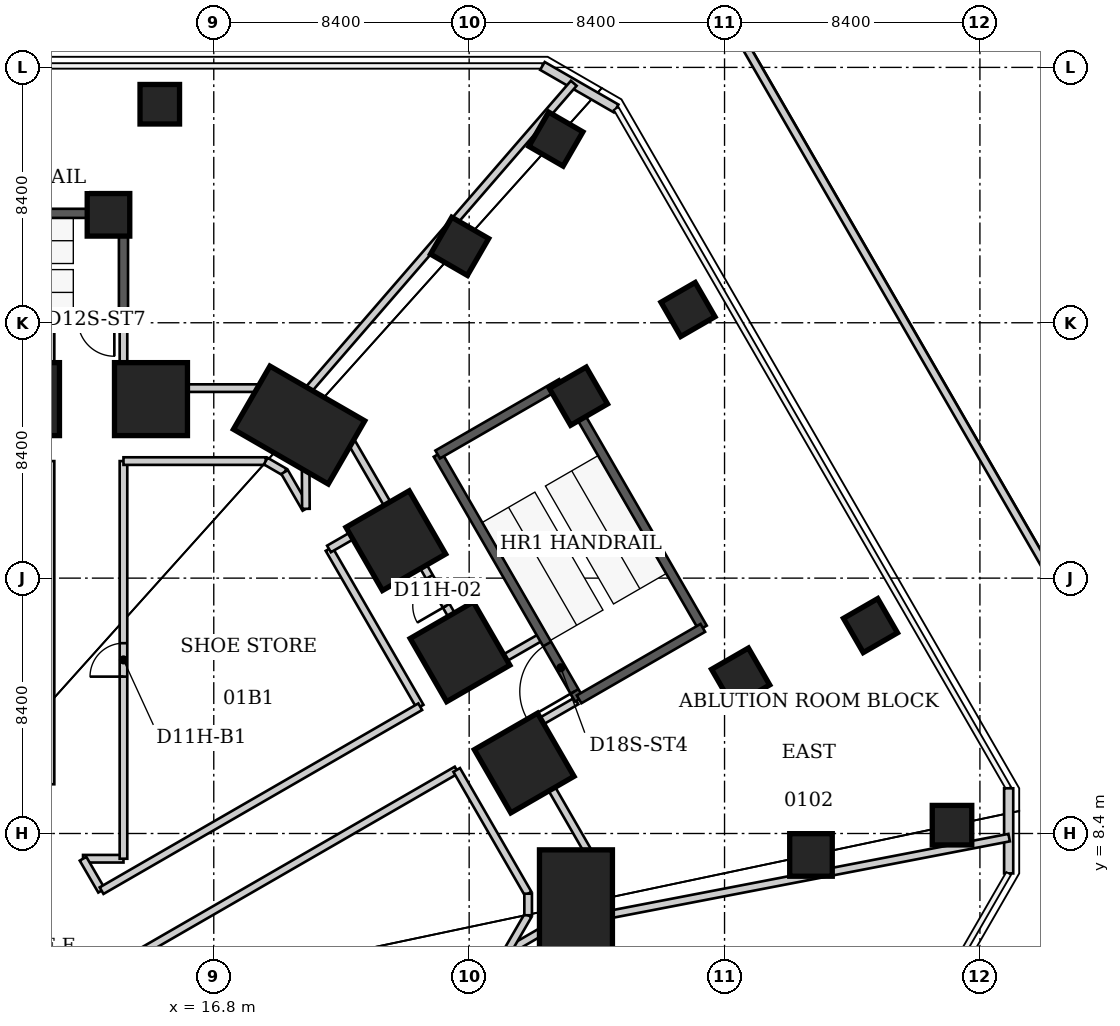
"""IFC4 building model, lengths in metres.
Left out: names, types, materials, properties, quantities, classifications, styles, units other than length and angle.
Written with IfcOpenShell. Run it as: python <this file> out.ifc"""

import sys

from ifc_helpers import new_model, si_unit, direction, frame, frame_2d, origin, origin_2d, place, context, subcontext, project, spatial, rectangle, extrude, element, fill, save


model = new_model("IFC4")
c1 = context("Model", 3, precision=1e-05, world=origin(), true_north=direction((0.0, 1.0)))
c2 = subcontext(c1, "Body", "Model", "MODEL_VIEW")
j1 = project(units=[si_unit("LENGTHUNIT", "METRE"), si_unit("PLANEANGLEUNIT", "RADIAN")], contexts=[c1])
p1 = place(None, origin())
s1 = spatial("IfcSite", under=j1, at=p1, CompositionType="ELEMENT")
p2 = place(p1, origin())
s2 = spatial("IfcBuilding", under=s1, at=p2, CompositionType="ELEMENT")
p3 = place(p2, frame((0.0, 0.0, 6.0)))
s3 = spatial("IfcBuildingStorey", under=s2, at=p3, CompositionType="ELEMENT", Elevation=6.0)
for number, where, z_axis, x_axis in (
    (1, (10.525, 22.689, 0.0), (0.0, 0.0, 1.0), (0.0, 1.0, 0.0)),
    (2, (14.735, 22.689, 0.0), (0.0, 0.0, 1.0), (0.0, 1.0, 0.0)),
):
    element("IfcColumn", number, at=place(p3, frame(where, z_axis=z_axis, x_axis=x_axis)), inside=s3, PredefinedType="COLUMN", context=c2, shape_type="SweptSolid", body=[
        extrude(rectangle(XDim=2.4, YDim=2.4, at=origin_2d()), origin(), (0.0, 0.0, 1.0), 6.0),
    ])
p4 = place(p3, frame((19.606, 21.835, 0.0), z_axis=(0.0, 0.0, 1.0), x_axis=(0.5, 0.866025403784, 0.0)))
e3 = element("IfcColumn", 3, at=p4, inside=s3, PredefinedType="COLUMN", context=c2, shape_type="SweptSolid", body=[
    extrude(rectangle(XDim=2.4, YDim=3.6, at=origin_2d()), origin(), (0.0, 0.0, 1.0), 6.0),
])
for number, where, z_axis, x_axis in (
    (4, (22.788, 18.032, 0.0), (0.0, 0.0, 1.0), (0.866, 0.5, 0.0)),
    (5, (24.899, 14.375, 0.0), (0.0, 0.0, 1.0), (0.866, 0.5, 0.0)),
    (6, (27.01, 10.719, 0.0), (0.0, 0.0, 1.0), (0.866, 0.5, 0.0)),
):
    element("IfcColumn", number, at=place(p3, frame(where, z_axis=z_axis, x_axis=x_axis)), inside=s3, PredefinedType="COLUMN", context=c2, shape_type="SweptSolid", body=[
        extrude(rectangle(XDim=2.4, YDim=2.4, at=origin_2d()), origin(), (0.0, 0.0, 1.0), 6.0),
    ])
p5 = place(p3, frame((28.713, 6.062, 0.0), z_axis=(0.0, 0.0, 1.0), x_axis=(1.0, 0.0, 0.0)))
e7 = element("IfcColumn", 7, at=p5, inside=s3, PredefinedType="COLUMN", context=c2, shape_type="SweptSolid", body=[
    extrude(rectangle(XDim=2.4, YDim=3.6, at=origin_2d()), origin(), (0.0, 0.0, 1.0), 6.0),
])
for number, where, z_axis, x_axis in (
    (8, (13.337, 28.751, 0.0), (0.0, 0.0, 1.0), (0.0, 1.0, 0.0)),
    (9, (24.885, 27.714, 0.0), (0.0, 0.0, 1.0), (0.5, 0.866, 0.0)),
    (10, (28.794, 22.785, 0.0), (0.0, 0.0, 1.0), (0.866, 0.5, 0.0)),
    (11, (34.129, 13.544, 0.0), (0.0, 0.0, 1.0), (0.866, 0.5, 0.0)),
    (12, (36.443, 7.694, 0.0), (0.0, 0.0, 1.0), (1.0, 0.0, 0.0)),
):
    element("IfcColumn", number, at=place(p3, frame(where, z_axis=z_axis, x_axis=x_axis)), inside=s3, PredefinedType="COLUMN", context=c2, shape_type="SweptSolid", body=[
        extrude(rectangle(XDim=1.4, YDim=1.4, at=origin_2d()), origin(), (0.0, 0.0, 1.0), 6.0),
    ])
for number, where, z_axis, x_axis in (
    (13, (15.024, 32.388, 0.0), (0.0, 0.0, 1.0), (0.0, 1.0, 0.0)),
    (14, (28.052, 31.241, 0.0), (0.0, 0.0, 1.0), (0.5, 0.866, 0.0)),
    (15, (32.397, 25.636, 0.0), (0.0, 0.0, 1.0), (0.866, 0.5, 0.0)),
    (16, (38.4, 15.239, 0.0), (0.0, 0.0, 1.0), (0.866, 0.5, 0.0)),
    (17, (41.082, 8.674, 0.0), (0.0, 0.0, 1.0), (1.0, 0.0, 0.0)),
):
    element("IfcColumn", number, at=place(p3, frame(where, z_axis=z_axis, x_axis=x_axis)), inside=s3, PredefinedType="COLUMN", context=c2, shape_type="SweptSolid", body=[
        extrude(rectangle(XDim=1.3, YDim=1.3, at=origin_2d()), origin(), (0.0, 0.0, 1.0), 6.0),
    ])
p6 = place(p3, frame((27.61, 33.648, 0.0), z_axis=(0.0, 0.0, 1.0), x_axis=(0.866056369097, -0.49994636267, 0.0)))
e18 = element("IfcWall", 18, at=p6, inside=s3, PredefinedType="SOLIDWALL", context=c2, shape_type="SweptSolid", body=[
    extrude(rectangle(XDim=2.8, YDim=0.3, at=frame_2d((1.4, 0.0))), origin(), (0.0, 0.0, 1.0), 5.84),
])
p7 = place(p3, frame((42.945, 9.887, 0.0), z_axis=(0.0, 0.0, 1.0), x_axis=(0.0, -1.0, 0.0)))
e19 = element("IfcWall", 19, at=p7, inside=s3, PredefinedType="SOLIDWALL", context=c2, shape_type="SweptSolid", body=[
    extrude(rectangle(XDim=2.8, YDim=0.3, at=frame_2d((1.4, 0.0))), origin(), (0.0, 0.0, 1.0), 5.84),
])
p8 = place(p3, frame((17.117, -45.292, 0.0), z_axis=(0.0, 0.0, 1.0), x_axis=(0.499999154746, 0.866025891791, 0.0)))
e20 = element("IfcWall", 20, at=p8, inside=s3, PredefinedType="PARAPET", context=c2, shape_type="SweptSolid", body=[
    extrude(rectangle(XDim=61.33, YDim=0.25, at=frame_2d((30.665, 0.0))), origin(), (0.0, 0.0, 1.0), 1.1),
])
p9 = place(p3, frame((47.784, 10.913, 0.0), z_axis=(0.0, 0.0, 1.0), x_axis=(-0.500005626994, 0.866022155013, 0.0)))
e21 = element("IfcWall", 21, at=p9, inside=s3, PredefinedType="PARAPET", context=c2, shape_type="SweptSolid", body=[
    extrude(rectangle(XDim=28.882, YDim=0.25, at=frame_2d((14.441, 0.0))), origin(), (0.0, 0.0, 1.0), 1.1),
])
p10 = place(p3, frame((11.43, 20.65, 0.0), z_axis=(0.0, 0.0, 1.0), x_axis=(0.0, -1.0, 0.0)))
e22 = element("IfcWall", 22, at=p10, inside=s3, PredefinedType="PARTITIONING", context=c2, shape_type="SweptSolid", body=[
    extrude(rectangle(XDim=10.63, YDim=0.25, at=frame_2d((5.315, 0.0))), origin(), (0.0, 0.0, 1.0), 5.84),
])
p11 = place(p3, frame((11.43, 25.2, 0.0), z_axis=(0.0, 0.0, 1.0), x_axis=(0.0, -1.0, 0.0)))
e23 = element("IfcWall", 23, at=p11, inside=s3, PredefinedType="PARTITIONING", context=c2, shape_type="SweptSolid", body=[
    extrude(rectangle(XDim=2.15, YDim=0.25, at=frame_2d((1.075, 0.0))), origin(), (0.0, 0.0, 1.0), 5.84),
])
p12 = place(p3, frame((12.23, 3.24, 0.0), z_axis=(0.0, 0.0, 1.0), x_axis=(0.866071776036, 0.499919672301, 0.0)))
e24 = element("IfcWall", 24, at=p12, inside=s3, PredefinedType="PARTITIONING", context=c2, shape_type="SweptSolid", body=[
    extrude(rectangle(XDim=14.502, YDim=0.25, at=frame_2d((7.251, 0.0))), origin(), (0.0, 0.0, 1.0), 5.84),
])
p13 = place(p3, frame((12.5, 7.57, 0.0), z_axis=(0.0, 0.0, 1.0), x_axis=(1.0, 0.0, 0.0)))
e25 = element("IfcWall", 25, at=p13, inside=s3, PredefinedType="PARTITIONING", context=c2, shape_type="SweptSolid", body=[
    extrude(rectangle(XDim=1.33, YDim=0.25, at=frame_2d((0.665, 0.0))), origin(), (0.0, 0.0, 1.0), 5.84),
])
p14 = place(p3, frame((13.11, 6.52, 0.0), z_axis=(0.0, 0.0, 1.0), x_axis=(-0.502382838514, 0.864645293497, 0.0)))
e26 = element("IfcWall", 26, at=p14, inside=s3, PredefinedType="PARTITIONING", context=c2, shape_type="SweptSolid", body=[
    extrude(rectangle(XDim=1.214, YDim=0.25, at=frame_2d((0.607, 0.0))), origin(), (0.0, 0.0, 1.0), 5.84),
])
p15 = place(p3, frame((13.83, 7.57, 0.0), z_axis=(0.0, 0.0, 1.0), x_axis=(0.0, 1.0, 0.0)))
e27 = element("IfcWall", 27, at=p15, inside=s3, PredefinedType="PARTITIONING", context=c2, shape_type="SweptSolid", body=[
    extrude(rectangle(XDim=13.08, YDim=0.25, at=frame_2d((6.54, 0.0))), origin(), (0.0, 0.0, 1.0), 5.84),
])
p16 = place(p15, frame((5.99, 0.0, 0.0)))
e28 = element("IfcOpeningElement", 28, at=p16, cuts=e27, PredefinedType="OPENING", context=c2, shape_type="SweptSolid", body=[
    extrude(rectangle(XDim=1.1, YDim=2.2, at=frame_2d((0.55, 1.1))), frame((0.0, 0.125, 0.0), z_axis=(0.0, -1.0, 0.0), x_axis=(1.0, 0.0, 0.0)), (0.0, 0.0, 1.0), 0.25),
])
p17 = place(p3, frame((13.83, 20.65, 0.0), z_axis=(0.0, 0.0, 1.0), x_axis=(1.0, 0.0, 0.0)))
e29 = element("IfcWall", 29, at=p17, inside=s3, PredefinedType="PARTITIONING", context=c2, shape_type="SweptSolid", body=[
    extrude(rectangle(XDim=4.68, YDim=0.25, at=frame_2d((2.34, 0.0))), origin(), (0.0, 0.0, 1.0), 5.84),
])
p18 = place(p3, frame((13.83, 23.05, 0.0), z_axis=(0.0, 0.0, 1.0), x_axis=(0.0, 1.0, 0.0)))
e30 = element("IfcWall", 30, at=p18, inside=s3, PredefinedType="PARTITIONING", context=c2, shape_type="SweptSolid", body=[
    extrude(rectangle(XDim=2.15, YDim=0.25, at=frame_2d((1.075, 0.0))), origin(), (0.0, 0.0, 1.0), 5.84),
])
p19 = place(p3, frame((18.51, 20.65, 0.0), z_axis=(0.0, 0.0, 1.0), x_axis=(0.864827114446, -0.502069778138, 0.0)))
e31 = element("IfcWall", 31, at=p19, inside=s3, PredefinedType="PARTITIONING", context=c2, shape_type="SweptSolid", body=[
    extrude(rectangle(XDim=0.717, YDim=0.25, at=frame_2d((0.358, 0.0))), origin(), (0.0, 0.0, 1.0), 5.84),
])
p20 = place(p3, frame((19.13, 20.29, 0.0), z_axis=(0.0, 0.0, 1.0), x_axis=(0.500871040665, -0.865521923826, 0.0)))
e32 = element("IfcWall", 32, at=p20, inside=s3, PredefinedType="PARTITIONING", context=c2, shape_type="SweptSolid", body=[
    extrude(rectangle(XDim=1.398, YDim=0.25, at=frame_2d((0.699, 0.0))), origin(), (0.0, 0.0, 1.0), 5.84),
])
p21 = place(p3, frame((19.15, 23.05, 0.0), z_axis=(0.0, 0.0, 1.0), x_axis=(-1.0, 0.0, 0.0)))
e33 = element("IfcWall", 33, at=p21, inside=s3, PredefinedType="PARTITIONING", context=c2, shape_type="SweptSolid", body=[
    extrude(rectangle(XDim=5.32, YDim=0.25, at=frame_2d((2.66, 0.0))), origin(), (0.0, 0.0, 1.0), 4.04),
])
p22 = place(p3, frame((19.15, 23.05, 0.0), z_axis=(0.0, 0.0, 1.0), x_axis=(0.866627900645, -0.498954989777, 0.0)))
e34 = element("IfcWall", 34, at=p22, inside=s3, PredefinedType="PARTITIONING", context=c2, shape_type="SweptSolid", body=[
    extrude(rectangle(XDim=0.588, YDim=0.25, at=frame_2d((0.294, 0.0))), origin(), (0.0, 0.0, 1.0), 5.84),
])
p23 = place(p3, frame((19.733, 22.715, 0.0), z_axis=(0.0, 0.0, 1.0), x_axis=(0.866550582058, -0.499089259287, 0.0)))
e35 = element("IfcWall", 35, at=p23, inside=s3, PredefinedType="PARTITIONING", context=c2, shape_type="SweptSolid", body=[
    extrude(rectangle(XDim=0.089, YDim=0.25, at=frame_2d((0.044, 0.0))), origin(), (0.0, 0.0, 1.0), 5.84),
])
p24 = place(p3, frame((19.83, 19.08, 0.0), z_axis=(0.0, 0.0, 1.0), x_axis=(-0.005576247883, 0.999984452609, 0.0)))
e36 = element("IfcWall", 36, at=p24, inside=s3, PredefinedType="PARTITIONING", context=c2, shape_type="SweptSolid", body=[
    extrude(rectangle(XDim=3.59, YDim=0.25, at=frame_2d((1.795, 0.0))), origin(), (0.0, 0.0, 1.0), 5.84),
])
p25 = place(p3, frame((20.59, 17.76, 0.0), z_axis=(0.0, 0.0, 1.0), x_axis=(0.50044857655, -0.865766263046, 0.0)))
e37 = element("IfcWall", 37, at=p25, inside=s3, PredefinedType="PARTITIONING", context=c2, shape_type="SweptSolid", body=[
    extrude(rectangle(XDim=5.995, YDim=0.25, at=frame_2d((2.997, 0.0))), origin(), (0.0, 0.0, 1.0), 5.84),
])
p26 = place(p3, frame((20.88, 22.05, 0.0), z_axis=(0.0, 0.0, 1.0), x_axis=(-0.865250488556, 0.501339796998, 0.0)))
e38 = element("IfcWall", 38, at=p26, inside=s3, PredefinedType="PARTITIONING", context=c2, shape_type="SweptSolid", body=[
    extrude(rectangle(XDim=1.236, YDim=0.25, at=frame_2d((0.618, 0.0))), origin(), (0.0, 0.0, 1.0), 5.84),
])
p27 = place(p3, frame((22.67, 18.96, 0.0), z_axis=(0.0, 0.0, 1.0), x_axis=(-0.866177122335, -0.499737123639, 0.0)))
e39 = element("IfcWall", 39, at=p27, inside=s3, PredefinedType="PARTITIONING", context=c2, shape_type="SweptSolid", body=[
    extrude(rectangle(XDim=2.401, YDim=0.25, at=frame_2d((1.201, 0.0))), origin(), (0.0, 0.0, 1.0), 5.84),
])
p28 = place(p3, frame((22.67, 18.96, 0.0), z_axis=(0.0, 0.0, 1.0), x_axis=(-0.501254541389, 0.865299881392, 0.0)))
e40 = element("IfcWall", 40, at=p28, inside=s3, PredefinedType="PARTITIONING", context=c2, shape_type="SweptSolid", body=[
    extrude(rectangle(XDim=3.571, YDim=0.25, at=frame_2d((1.786, 0.0))), origin(), (0.0, 0.0, 1.0), 5.84),
])
p29 = place(p3, frame((23.59, 12.57, 0.0), z_axis=(0.0, 0.0, 1.0), x_axis=(-0.866045825216, -0.499964627375, 0.0)))
e41 = element("IfcWall", 41, at=p29, inside=s3, PredefinedType="PARTITIONING", context=c2, shape_type="SweptSolid", body=[
    extrude(rectangle(XDim=12.101, YDim=0.25, at=frame_2d((6.051, 0.0))), origin(), (0.0, 0.0, 1.0), 5.84),
])
p30 = place(p3, frame((23.95, -4.61, 0.0), z_axis=(0.0, 0.0, 1.0), x_axis=(0.50047095257, 0.865753328399, 0.0)))
e42 = element("IfcWall", 42, at=p30, inside=s3, PredefinedType="PARTITIONING", context=c2, shape_type="SweptSolid", body=[
    extrude(rectangle(XDim=11.17, YDim=0.25, at=frame_2d((5.585, 0.0))), origin(), (0.0, 0.0, 1.0), 4.04),
])
p31 = place(p3, frame((24.79, 10.49, 0.0), z_axis=(0.0, 0.0, 1.0), x_axis=(0.499999753078, -0.866025546345, 0.0)))
e43 = element("IfcWall", 43, at=p31, inside=s3, PredefinedType="PARTITIONING", context=c2, shape_type="SweptSolid", body=[
    extrude(rectangle(XDim=4.7, YDim=0.25, at=frame_2d((2.35, 0.0))), origin(), (0.0, 0.0, 1.0), 5.84),
])
p32 = place(p3, frame((25.67, 13.77, 0.0), z_axis=(0.0, 0.0, 1.0), x_axis=(-0.50044857655, 0.865766263046, 0.0)))
e44 = element("IfcWall", 44, at=p32, inside=s3, PredefinedType="PARTITIONING", context=c2, shape_type="SweptSolid", body=[
    extrude(rectangle(XDim=5.995, YDim=0.25, at=frame_2d((2.997, 0.0))), origin(), (0.0, 0.0, 1.0), 4.04),
])
p33 = place(p32, frame((2.448, 0.0, 0.0)))
e45 = element("IfcOpeningElement", 45, at=p33, cuts=e44, PredefinedType="OPENING", context=c2, shape_type="SweptSolid", body=[
    extrude(rectangle(XDim=1.1, YDim=2.2, at=frame_2d((0.55, 1.1))), frame((0.0, 0.125, 0.0), z_axis=(0.0, -1.0, 0.0), x_axis=(1.0, 0.0, 0.0)), (0.0, 0.0, 1.0), 0.25),
])
p34 = place(p3, frame((26.45, 4.52, 0.0), z_axis=(0.0, 0.0, 1.0), x_axis=(0.865299881392, 0.501254541389, 0.0)))
e46 = element("IfcWall", 46, at=p34, inside=s3, PredefinedType="PARTITIONING", context=c2, shape_type="SweptSolid", body=[
    extrude(rectangle(XDim=3.571, YDim=0.25, at=frame_2d((1.786, 0.0))), origin(), (0.0, 0.0, 1.0), 5.84),
])
p35 = place(p3, frame((26.87, 11.69, 0.0), z_axis=(0.0, 0.0, 1.0), x_axis=(0.866775979586, 0.498697705241, 0.0)))
e47 = element("IfcWall", 47, at=p35, inside=s3, PredefinedType="PARTITIONING", context=c2, shape_type="SweptSolid", body=[
    extrude(rectangle(XDim=2.146, YDim=0.25, at=frame_2d((1.073, 0.0))), origin(), (0.0, 0.0, 1.0), 5.84),
])
p36 = place(p3, frame((27.14, 5.71, 0.0), z_axis=(0.0, 0.0, 1.0), x_axis=(-0.501595895466, -0.865102050426, 0.0)))
e48 = element("IfcWall", 48, at=p36, inside=s3, PredefinedType="PARTITIONING", context=c2, shape_type="SweptSolid", body=[
    extrude(rectangle(XDim=1.375, YDim=0.25, at=frame_2d((0.688, 0.0))), origin(), (0.0, 0.0, 1.0), 5.84),
])
p37 = place(p3, frame((27.14, 6.42, 0.0), z_axis=(0.0, 0.0, 1.0), x_axis=(0.0, -1.0, 0.0)))
e49 = element("IfcWall", 49, at=p37, inside=s3, PredefinedType="PARTITIONING", context=c2, shape_type="SweptSolid", body=[
    extrude(rectangle(XDim=0.71, YDim=0.25, at=frame_2d((0.355, 0.0))), origin(), (0.0, 0.0, 1.0), 5.84),
])
p38 = place(p3, frame((27.53, 14.84, 0.0), z_axis=(0.0, 0.0, 1.0), x_axis=(-0.866804272416, -0.498648526841, 0.0)))
e50 = element("IfcWall", 50, at=p38, inside=s3, PredefinedType="PARTITIONING", context=c2, shape_type="SweptSolid", body=[
    extrude(rectangle(XDim=2.146, YDim=0.25, at=frame_2d((1.073, 0.0))), origin(), (0.0, 0.0, 1.0), 5.84),
])
p39 = place(p3, frame((28.64, 33.077, 0.0), z_axis=(0.0, 0.0, 1.0), x_axis=(-0.654569518712, -0.756001815589, 0.0)))
e51 = element("IfcWall", 51, at=p39, inside=s3, PredefinedType="PARTITIONING", context=c2, shape_type="SweptSolid", body=[
    extrude(rectangle(XDim=13.674, YDim=0.25, at=frame_2d((6.837, 0.0))), origin(), (0.0, 0.0, 1.0), 5.75),
])
p40 = place(p3, frame((29.54, 5.645, 0.0), z_axis=(0.0, 0.0, 1.0), x_axis=(0.0, -1.0, 0.0)))
e52 = element("IfcWall", 52, at=p40, inside=s3, PredefinedType="PARTITIONING", context=c2, shape_type="SweptSolid", body=[
    extrude(rectangle(XDim=0.585, YDim=0.25, at=frame_2d((0.292, 0.0))), origin(), (0.0, 0.0, 1.0), 5.84),
])
p41 = place(p3, frame((29.54, 5.68, 0.0), z_axis=(0.0, 0.0, 1.0), x_axis=(0.0, 1.0, 0.0)))
e53 = element("IfcWall", 53, at=p41, inside=s3, PredefinedType="PARTITIONING", context=c2, shape_type="SweptSolid", body=[
    extrude(rectangle(XDim=0.63, YDim=0.25, at=frame_2d((0.315, 0.0))), origin(), (0.0, 0.0, 1.0), 5.84),
])
p42 = place(p3, frame((29.54, 6.31, 0.0), z_axis=(0.0, 0.0, 1.0), x_axis=(0.0, 1.0, 0.0)))
e54 = element("IfcWall", 54, at=p42, inside=s3, PredefinedType="PARTITIONING", context=c2, shape_type="SweptSolid", body=[
    extrude(rectangle(XDim=0.75, YDim=0.25, at=frame_2d((0.375, 0.0))), origin(), (0.0, 0.0, 1.0), 5.84),
])
p43 = place(p3, frame((29.54, 7.06, 0.0), z_axis=(0.0, 0.0, 1.0), x_axis=(-0.499558989476, 0.866279871655, 0.0)))
e55 = element("IfcWall", 55, at=p43, inside=s3, PredefinedType="PARTITIONING", context=c2, shape_type="SweptSolid", body=[
    extrude(rectangle(XDim=5.344, YDim=0.25, at=frame_2d((2.672, 0.0))), origin(), (0.0, 0.0, 1.0), 4.04),
])
p44 = place(p3, frame((42.96, 8.264, 0.0), z_axis=(0.0, 0.0, 1.0), x_axis=(-0.981957231685, -0.189103133611, 0.0)))
e56 = element("IfcWall", 56, at=p44, inside=s3, PredefinedType="PARTITIONING", context=c2, shape_type="SweptSolid", body=[
    extrude(rectangle(XDim=13.667, YDim=0.25, at=frame_2d((6.833, 0.0))), origin(), (0.0, 0.0, 1.0), 5.75),
])
p45 = place(p3, frame((28.815, 12.813, 0.0), z_axis=(0.0, 0.0, 1.0), x_axis=(-0.500015592816, 0.866016401081, 0.0)))
e57 = element("IfcWall", 57, at=p45, inside=s3, PredefinedType="SHEAR", context=c2, shape_type="SweptSolid", body=[
    extrude(rectangle(XDim=9.3, YDim=0.3, at=frame_2d((4.65, 0.0))), origin(), (0.0, 0.0, 1.0), 6.0),
])
p46 = place(p45, frame((0.3, 0.0, 0.0)))
e58 = element("IfcOpeningElement", 58, at=p46, cuts=e57, PredefinedType="OPENING", context=c2, shape_type="SweptSolid", body=[
    extrude(rectangle(XDim=1.8, YDim=2.4, at=frame_2d((0.9, 1.2))), frame((0.0, 0.15, 0.0), z_axis=(0.0, -1.0, 0.0), x_axis=(1.0, 0.0, 0.0)), (0.0, 0.0, 1.0), 0.3),
])
p47 = place(p3, frame((24.165, 20.867, 0.0), z_axis=(0.0, 0.0, 1.0), x_axis=(0.866016039709, 0.500016218704, 0.0)))
e59 = element("IfcWall", 59, at=p47, inside=s3, PredefinedType="SHEAR", context=c2, shape_type="SweptSolid", body=[
    extrude(rectangle(XDim=4.7, YDim=0.3, at=frame_2d((2.35, 0.0))), origin(), (0.0, 0.0, 1.0), 6.0),
])
p48 = place(p3, frame((28.235, 23.217, 0.0), z_axis=(0.0, 0.0, 1.0), x_axis=(0.500004225487, -0.866022964185, 0.0)))
e60 = element("IfcWall", 60, at=p48, inside=s3, PredefinedType="SHEAR", context=c2, shape_type="SweptSolid", body=[
    extrude(rectangle(XDim=9.3, YDim=0.3, at=frame_2d((4.65, 0.0))), origin(), (0.0, 0.0, 1.0), 6.0),
])
p49 = place(p3, frame((32.885, 15.163, 0.0), z_axis=(0.0, 0.0, 1.0), x_axis=(-0.866038532462, -0.499977259774, 0.0)))
e61 = element("IfcWall", 61, at=p49, inside=s3, PredefinedType="SHEAR", context=c2, shape_type="SweptSolid", body=[
    extrude(rectangle(XDim=4.7, YDim=0.3, at=frame_2d((2.35, 0.0))), origin(), (0.0, 0.0, 1.0), 6.0),
])
p50 = place(p3, frame((13.83, 25.299, 0.0), z_axis=(0.0, 0.0, 1.0), x_axis=(-1.0, 0.0, 0.0)))
e62 = element("IfcWall", 62, at=p50, inside=s3, PredefinedType="SHEAR", context=c2, shape_type="SweptSolid", body=[
    extrude(rectangle(XDim=9.3, YDim=0.3, at=frame_2d((4.65, 0.0))), origin(), (0.0, 0.0, 1.0), 6.0),
])
p51 = place(p50, frame((0.3, 0.0, 0.0)))
e63 = element("IfcOpeningElement", 63, at=p51, cuts=e62, PredefinedType="OPENING", context=c2, shape_type="SweptSolid", body=[
    extrude(rectangle(XDim=1.2, YDim=2.4, at=frame_2d((0.6, 1.2))), frame((0.0, 0.15, 0.0), z_axis=(0.0, -1.0, 0.0), x_axis=(1.0, 0.0, 0.0)), (0.0, 0.0, 1.0), 0.3),
])
p52 = place(p3, frame((4.53, 28.799, 0.0), z_axis=(0.0, 0.0, 1.0), x_axis=(1.0, 0.0, 0.0)))
e64 = element("IfcWall", 64, at=p52, inside=s3, PredefinedType="SHEAR", context=c2, shape_type="SweptSolid", body=[
    extrude(rectangle(XDim=9.3, YDim=0.3, at=frame_2d((4.65, 0.0))), origin(), (0.0, 0.0, 1.0), 6.0),
])
p53 = place(p3, frame((13.83, 28.799, 0.0), z_axis=(0.0, 0.0, 1.0), x_axis=(0.0, -1.0, 0.0)))
e65 = element("IfcWall", 65, at=p53, inside=s3, PredefinedType="SHEAR", context=c2, shape_type="SweptSolid", body=[
    extrude(rectangle(XDim=3.5, YDim=0.3, at=frame_2d((1.75, 0.0))), origin(), (0.0, 0.0, 1.0), 6.0),
])
p54 = place(p33, origin())
e66 = element("IfcDoor", 66, at=p54, inside=s3, OperationType="SINGLE_SWING_LEFT", PredefinedType="DOOR", context=c2, shape_type="SweptSolid", body=[
    extrude(rectangle(XDim=1.1, YDim=2.2, at=frame_2d((0.55, 1.1))), frame((0.0, 0.025, 0.0), z_axis=(0.0, -1.0, 0.0), x_axis=(1.0, 0.0, 0.0)), (0.0, 0.0, 1.0), 0.05),
])
fill(e45, e66)
p55 = place(p16, origin())
e67 = element("IfcDoor", 67, at=p55, inside=s3, OperationType="SINGLE_SWING_LEFT", PredefinedType="DOOR", context=c2, shape_type="SweptSolid", body=[
    extrude(rectangle(XDim=1.1, YDim=2.2, at=frame_2d((0.55, 1.1))), frame((0.0, 0.025, 0.0), z_axis=(0.0, -1.0, 0.0), x_axis=(1.0, 0.0, 0.0)), (0.0, 0.0, 1.0), 0.05),
])
fill(e28, e67)
p56 = place(p46, origin())
e68 = element("IfcDoor", 68, at=p56, inside=s3, OperationType="DOUBLE_DOOR_SINGLE_SWING", PredefinedType="DOOR", context=c2, shape_type="SweptSolid", body=[
    extrude(rectangle(XDim=1.8, YDim=2.4, at=frame_2d((0.9, 1.2))), frame((0.0, 0.025, 0.0), z_axis=(0.0, -1.0, 0.0), x_axis=(1.0, 0.0, 0.0)), (0.0, 0.0, 1.0), 0.05),
])
fill(e58, e68)
p57 = place(p51, origin())
e69 = element("IfcDoor", 69, at=p57, inside=s3, OperationType="SINGLE_SWING_LEFT", PredefinedType="DOOR", context=c2, shape_type="SweptSolid", body=[
    extrude(rectangle(XDim=1.2, YDim=2.4, at=frame_2d((0.6, 1.2))), frame((0.0, 0.025, 0.0), z_axis=(0.0, -1.0, 0.0), x_axis=(1.0, 0.0, 0.0)), (0.0, 0.0, 1.0), 0.05),
])
fill(e63, e69)
save(model, sys.argv[1])
